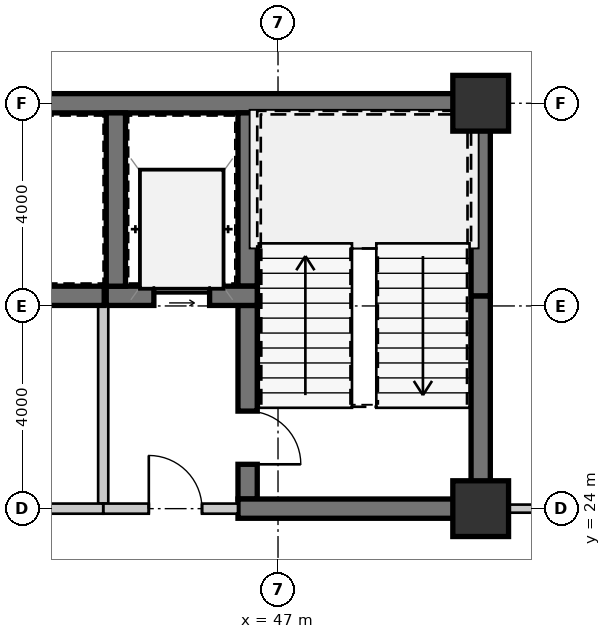
"""IFC4 building model, lengths in metres.
Left out: names, types, materials, properties, quantities, classifications, styles, units other than length and angle.
Written with IfcOpenShell. Run it as: python <this file> out.ifc"""

import sys

from ifc_helpers import new_model, si_unit, direction, frame, frame_2d, origin, origin_2d, place, context, subcontext, project, spatial, rectangle, extrude, source, transform, mapped, element, fill, save


model = new_model("IFC4")
c1 = context("Model", 3, precision=1e-05, world=origin(), true_north=direction((0.0, 1.0)))
c2 = subcontext(c1, "Body", "Model", "MODEL_VIEW")
j1 = project(units=[si_unit("LENGTHUNIT", "METRE"), si_unit("PLANEANGLEUNIT", "RADIAN")], contexts=[c1])
p1 = place(None, origin())
s1 = spatial("IfcSite", under=j1, at=p1, CompositionType="ELEMENT")
p2 = place(p1, origin())
s2 = spatial("IfcBuilding", under=s1, at=p2, CompositionType="ELEMENT")
p3 = place(p2, frame((0.0, 0.0, 16.8)))
s3 = spatial("IfcBuildingStorey", under=s2, at=p3, CompositionType="ELEMENT", Elevation=16.8)
m1 = source(origin(), c2, "Body", "SweptSolid", [
    extrude(rectangle(XDim=1.1, YDim=1.1, at=origin_2d()), origin(), (0.0, 0.0, 1.0), 3.15),
])
for number, where, z_axis, x_axis in (
    (1, (51.0, 24.0, 0.0), (0.0, 0.0, 1.0), (1.0, 0.0, 0.0)),
    (2, (51.0, 32.0, 0.0), (0.0, 0.0, 1.0), (1.0, 0.0, 0.0)),
):
    element("IfcColumn", number, at=place(p3, frame(where, z_axis=z_axis, x_axis=x_axis)), inside=s3, PredefinedType="COLUMN", context=c2, shape_type="MappedRepresentation", body=[
        mapped(m1, transform((0.0, 0.0, 0.0), scale=1.0)),
    ])
m2 = source(origin(), c2, "Body", "SweptSolid", [
    extrude(rectangle(XDim=11.99, YDim=0.38, at=frame_2d((5.995, 0.0))), origin(), (0.0, 0.0, 1.0), 2.93),
])
p4 = place(p3, frame((39.2, 32.0, 0.0), z_axis=(0.0, 0.0, 1.0), x_axis=(1.0, 0.0, 0.0)))
e3 = element("IfcWall", 3, at=p4, inside=s3, PredefinedType="SHEAR", context=c2, shape_type="MappedRepresentation", body=[
    mapped(m2, transform((0.0, 0.0, 0.0), scale=1.0)),
])
m3 = source(origin(), c2, "Body", "SweptSolid", [
    extrude(rectangle(XDim=4.01, YDim=0.38, at=frame_2d((2.005, 0.0))), origin(), (0.0, 0.0, 1.0), 2.93),
])
p5 = place(p3, frame((51.0, 24.19, 0.0), z_axis=(0.0, 0.0, 1.0), x_axis=(0.0, 1.0, 0.0)))
e4 = element("IfcWall", 4, at=p5, inside=s3, PredefinedType="SHEAR", context=c2, shape_type="MappedRepresentation", body=[
    mapped(m3, transform((0.0, 0.0, 0.0), scale=1.0)),
])
m4 = source(origin(), c2, "Body", "SweptSolid", [
    extrude(rectangle(XDim=3.61, YDim=0.38, at=frame_2d((1.805, 0.0))), origin(), (0.0, 0.0, 1.0), 2.93),
])
p6 = place(p3, frame((51.0, 28.2, 0.0), z_axis=(0.0, 0.0, 1.0), x_axis=(0.0, 1.0, 0.0)))
e5 = element("IfcWall", 5, at=p6, inside=s3, PredefinedType="SHEAR", context=c2, shape_type="MappedRepresentation", body=[
    mapped(m4, transform((0.0, 0.0, 0.0), scale=1.0)),
])
m5 = source(origin(), c2, "Body", "SweptSolid", [
    extrude(rectangle(XDim=3.42, YDim=0.38, at=frame_2d((1.71, 0.0))), origin(), (0.0, 0.0, 1.0), 2.93),
])
p7 = place(p3, frame((46.4, 31.81, 0.0), z_axis=(0.0, 0.0, 1.0), x_axis=(0.0, -1.0, 0.0)))
e6 = element("IfcWall", 6, at=p7, inside=s3, PredefinedType="SHEAR", context=c2, shape_type="MappedRepresentation", body=[
    mapped(m5, transform((0.0, 0.0, 0.0), scale=1.0)),
])
m6 = source(origin(), c2, "Body", "SweptSolid", [
    extrude(rectangle(XDim=3.82, YDim=0.38, at=frame_2d((1.91, 0.0))), origin(), (0.0, 0.0, 1.0), 2.93),
])
p8 = place(p3, frame((46.4, 28.01, 0.0), z_axis=(0.0, 0.0, 1.0), x_axis=(0.0, -1.0, 0.0)))
e7 = element("IfcWall", 7, at=p8, inside=s3, PredefinedType="SHEAR", context=c2, shape_type="MappedRepresentation", body=[
    mapped(m6, transform((0.0, 0.0, 0.0), scale=1.0)),
])
m7 = source(origin(), c2, "Body", "SweptSolid", [
    extrude(rectangle(XDim=1.05, YDim=2.1, at=frame_2d((0.525, 1.05))), frame((0.0, 0.2, 0.0), z_axis=(0.0, -1.0, 0.0), x_axis=(1.0, 0.0, 0.0)), (0.0, 0.0, 1.0), 0.4),
])
p9 = place(p8, frame((2.085, 0.0, 0.0)))
e8 = element("IfcOpeningElement", 8, at=p9, cuts=e7, PredefinedType="OPENING", context=c2, shape_type="MappedRepresentation", body=[
    mapped(m7, transform((0.0, 0.0, 0.0), scale=1.0)),
])
m8 = source(origin(), c2, "Body", "SweptSolid", [
    extrude(rectangle(XDim=4.98, YDim=0.38, at=frame_2d((2.49, 0.0))), origin(), (0.0, 0.0, 1.0), 2.93),
])
p10 = place(p3, frame((46.21, 24.0, 0.0), z_axis=(0.0, 0.0, 1.0), x_axis=(1.0, 0.0, 0.0)))
e9 = element("IfcWall", 9, at=p10, inside=s3, PredefinedType="SHEAR", context=c2, shape_type="MappedRepresentation", body=[
    mapped(m8, transform((0.0, 0.0, 0.0), scale=1.0)),
])
m9 = source(origin(), c2, "Body", "SweptSolid", [
    extrude(rectangle(XDim=2.98, YDim=0.38, at=frame_2d((1.49, 0.0))), origin(), (0.0, 0.0, 1.0), 2.93),
])
p11 = place(p3, frame((43.61, 28.2, 0.0), z_axis=(0.0, 0.0, 1.0), x_axis=(1.0, 0.0, 0.0)))
e10 = element("IfcWall", 10, at=p11, inside=s3, PredefinedType="SHEAR", context=c2, shape_type="MappedRepresentation", body=[
    mapped(m9, transform((0.0, 0.0, 0.0), scale=1.0)),
])
m10 = source(origin(), c2, "Body", "SweptSolid", [
    extrude(rectangle(XDim=1.1, YDim=2.15, at=frame_2d((0.55, 1.075))), frame((0.0, 0.2, 0.0), z_axis=(0.0, -1.0, 0.0), x_axis=(1.0, 0.0, 0.0)), (0.0, 0.0, 1.0), 0.4),
])
p12 = place(p11, frame((0.94, 0.0, 0.0)))
e11 = element("IfcOpeningElement", 11, at=p12, cuts=e10, PredefinedType="OPENING", context=c2, shape_type="MappedRepresentation", body=[
    mapped(m10, transform((0.0, 0.0, 0.0), scale=1.0)),
])
p13 = place(p3, frame((43.8, 31.81, 0.0), z_axis=(0.0, 0.0, 1.0), x_axis=(0.0, -1.0, 0.0)))
e12 = element("IfcWall", 12, at=p13, inside=s3, PredefinedType="SHEAR", context=c2, shape_type="MappedRepresentation", body=[
    mapped(m5, transform((0.0, 0.0, 0.0), scale=1.0)),
])
m11 = source(origin(), c2, "Body", "SweptSolid", [
    extrude(rectangle(XDim=3.91, YDim=0.2, at=frame_2d((1.955, 0.0))), origin(), (0.0, 0.0, 1.0), 2.93),
])
p14 = place(p3, frame((43.55, 28.01, 0.0), z_axis=(0.0, 0.0, 1.0), x_axis=(0.0, -1.0, 0.0)))
e13 = element("IfcWall", 13, at=p14, inside=s3, PredefinedType="SOLIDWALL", context=c2, shape_type="MappedRepresentation", body=[
    mapped(m11, transform((0.0, 0.0, 0.0), scale=1.0)),
])
m12 = source(origin(), c2, "Body", "SweptSolid", [
    extrude(rectangle(XDim=2.66, YDim=0.2, at=frame_2d((1.33, 0.0))), origin(), (0.0, 0.0, 1.0), 2.397),
])
p15 = place(p3, frame((43.55, 24.0, 0.0), z_axis=(0.0, 0.0, 1.0), x_axis=(1.0, 0.0, 0.0)))
e14 = element("IfcWall", 14, at=p15, inside=s3, PredefinedType="SOLIDWALL", context=c2, shape_type="MappedRepresentation", body=[
    mapped(m12, transform((0.0, 0.0, 0.0), scale=1.0)),
])
m13 = source(origin(), c2, "Body", "SweptSolid", [
    extrude(rectangle(XDim=1.05, YDim=2.1, at=frame_2d((0.525, 1.05))), frame((0.0, 0.11, 0.0), z_axis=(0.0, -1.0, 0.0), x_axis=(1.0, 0.0, 0.0)), (0.0, 0.0, 1.0), 0.22),
])
p16 = place(p15, frame((0.9, 0.0, 0.0)))
e15 = element("IfcOpeningElement", 15, at=p16, cuts=e14, PredefinedType="OPENING", context=c2, shape_type="MappedRepresentation", body=[
    mapped(m13, transform((0.0, 0.0, 0.0), scale=1.0)),
])
m14 = source(origin(), c2, "Body", "SweptSolid", [
    extrude(rectangle(XDim=1.44, YDim=0.38, at=frame_2d((0.72, 0.0))), origin(), (0.0, 0.0, 1.0), 2.93),
])
p17 = place(p3, frame((42.13, 28.2, 0.0), z_axis=(0.0, 0.0, 1.0), x_axis=(1.0, 0.0, 0.0)))
e16 = element("IfcWall", 16, at=p17, inside=s3, PredefinedType="SHEAR", context=c2, shape_type="MappedRepresentation", body=[
    mapped(m14, transform((0.0, 0.0, 0.0), scale=1.0)),
])
m15 = source(origin(), c2, "Body", "SweptSolid", [
    extrude(rectangle(XDim=4.35, YDim=0.2, at=frame_2d((2.175, 0.0))), origin(), (0.0, 0.0, 1.0), 2.397),
])
p18 = place(p3, frame((43.55, 24.0, 0.0), z_axis=(0.0, 0.0, 1.0), x_axis=(-1.0, 0.0, 0.0)))
e17 = element("IfcWall", 17, at=p18, inside=s3, PredefinedType="SOLIDWALL", context=c2, shape_type="MappedRepresentation", body=[
    mapped(m15, transform((0.0, 0.0, 0.0), scale=1.0)),
])
p19 = place(p18, frame((2.4, 0.0, 0.0)))
e18 = element("IfcOpeningElement", 18, at=p19, cuts=e17, PredefinedType="OPENING", context=c2, shape_type="MappedRepresentation", body=[
    mapped(m13, transform((0.0, 0.0, 0.0), scale=1.0)),
])
m16 = source(origin(), c2, "Body", "SweptSolid", [
    extrude(rectangle(XDim=4.13, YDim=0.16, at=frame_2d((2.065, 0.0))), origin(), (0.0, 0.0, 1.0), 2.93),
])
p20 = place(p3, frame((51.19, 24.0, 0.0), z_axis=(0.0, 0.0, 1.0), x_axis=(1.0, 0.0, 0.0)))
e19 = element("IfcWall", 19, at=p20, inside=s3, PredefinedType="PARTITIONING", context=c2, shape_type="MappedRepresentation", body=[
    mapped(m16, transform((0.0, 0.0, 0.0), scale=1.0)),
])
m17 = source(origin(), c2, "Body", "SweptSolid", [
    extrude(rectangle(XDim=1.05, YDim=2.1, at=frame_2d((0.525, 1.05))), frame((0.0, 0.025, 0.0), z_axis=(0.0, -1.0, 0.0), x_axis=(1.0, 0.0, 0.0)), (0.0, 0.0, 1.0), 0.05),
])
p21 = place(p9, origin())
e20 = element("IfcDoor", 20, at=p21, inside=s3, OperationType="SINGLE_SWING_RIGHT", PredefinedType="DOOR", context=c2, shape_type="MappedRepresentation", body=[
    mapped(m17, transform((0.0, 0.0, 0.0), scale=1.0)),
])
fill(e8, e20)
m18 = source(origin(), c2, "Body", "SweptSolid", [
    extrude(rectangle(XDim=1.1, YDim=2.15, at=frame_2d((0.55, 1.075))), frame((0.0, 0.025, 0.0), z_axis=(0.0, -1.0, 0.0), x_axis=(1.0, 0.0, 0.0)), (0.0, 0.0, 1.0), 0.05),
])
p22 = place(p12, origin())
e21 = element("IfcDoor", 21, at=p22, inside=s3, OperationType="SLIDING_TO_LEFT", PredefinedType="DOOR", context=c2, shape_type="MappedRepresentation", body=[
    mapped(m18, transform((0.0, 0.0, 0.0), scale=1.0)),
])
fill(e11, e21)
p23 = place(p16, origin())
e22 = element("IfcDoor", 22, at=p23, inside=s3, OperationType="SINGLE_SWING_LEFT", PredefinedType="DOOR", context=c2, shape_type="MappedRepresentation", body=[
    mapped(m17, transform((0.0, 0.0, 0.0), scale=1.0)),
])
fill(e15, e22)
save(model, sys.argv[1])
